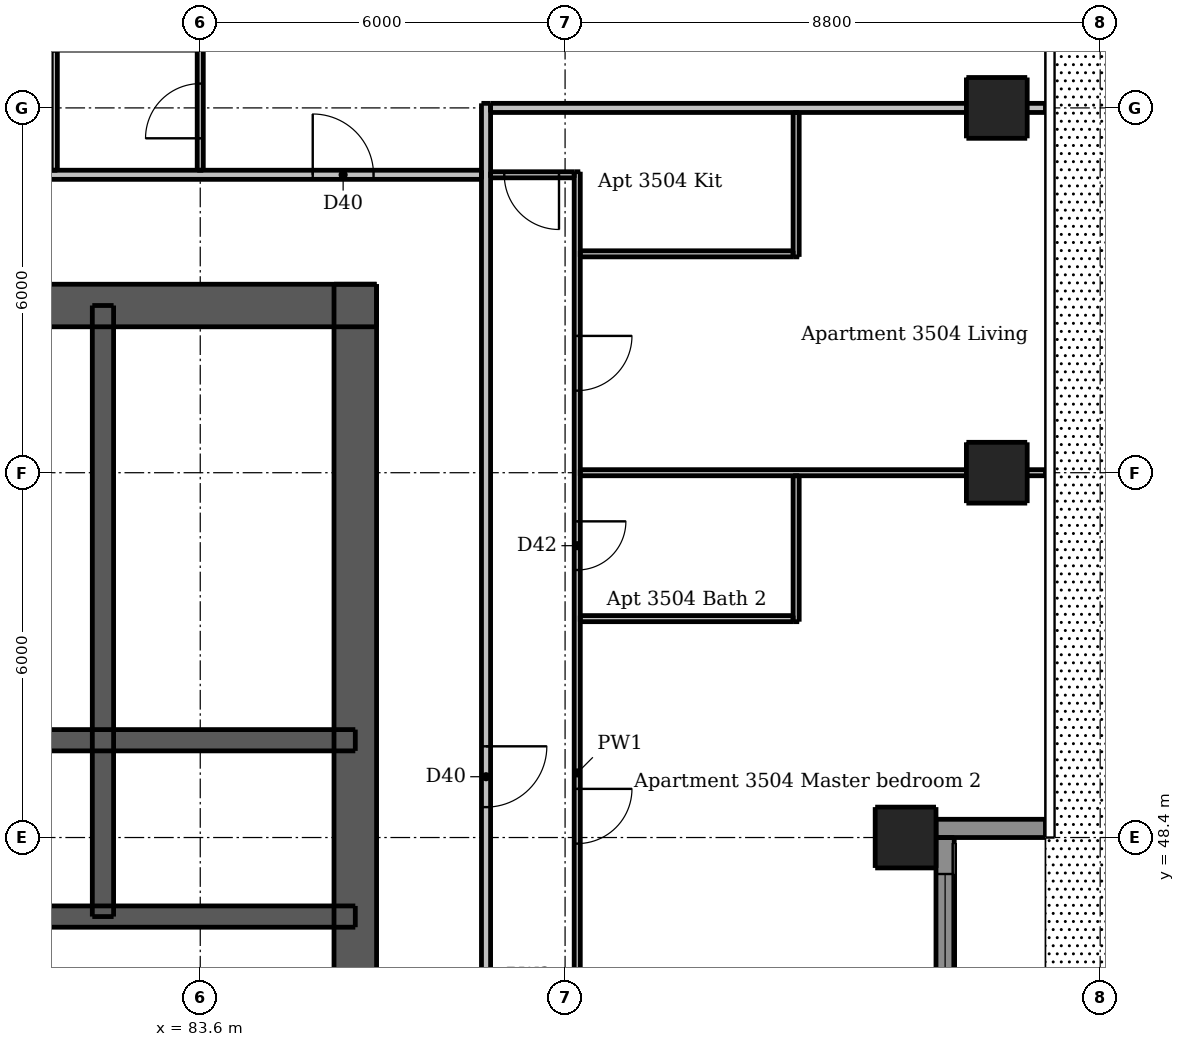
"""IFC4 building model, lengths in metres.
Left out: names, types, materials, properties, quantities, classifications, styles, units other than length and angle.
Written with IfcOpenShell. Run it as: python <this file> out.ifc"""

import sys

from ifc_helpers import new_model, si_unit, direction, frame, frame_2d, origin, origin_2d, place, context, subcontext, project, spatial, rectangle, extrude, element, fill, save


model = new_model("IFC4")
c1 = context("Model", 3, precision=1e-05, world=origin(), true_north=direction((0.0, 1.0)))
c2 = subcontext(c1, "Body", "Model", "MODEL_VIEW")
j1 = project(units=[si_unit("LENGTHUNIT", "METRE"), si_unit("PLANEANGLEUNIT", "RADIAN")], contexts=[c1])
p1 = place(None, origin())
s1 = spatial("IfcSite", under=j1, at=p1, CompositionType="ELEMENT")
p2 = place(p1, origin())
s2 = spatial("IfcBuilding", under=s1, at=p2, CompositionType="ELEMENT")
p3 = place(p2, frame((0.0, 0.0, 133.9)))
s3 = spatial("IfcBuildingStorey", under=s2, at=p3, CompositionType="ELEMENT", Elevation=133.9)
p4 = place(p3, frame((62.5, 57.15, 0.0), z_axis=(0.0, 0.0, 1.0), x_axis=(1.0, 0.0, 0.0)))
e1 = element("IfcWall", 1, at=p4, inside=s3, PredefinedType="SHEAR", context=c2, shape_type="SweptSolid", body=[
    extrude(rectangle(XDim=24.0, YDim=0.7, at=frame_2d((12.0, 0.0))), origin(), (0.0, 0.0, 1.0), 3.05),
])
p5 = place(p4, frame((20.938, 0.0, 0.0)))
e2 = element("IfcOpeningElement", 2, at=p5, cuts=e1, PredefinedType="OPENING", context=c2, shape_type="SweptSolid", body=[
    extrude(rectangle(XDim=1.1, YDim=2.1, at=frame_2d((0.55, 1.05))), frame((0.0, 0.36, 0.0), z_axis=(0.0, -1.0, 0.0), x_axis=(1.0, 0.0, 0.0)), (0.0, 0.0, 1.0), 0.72),
])
p6 = place(p4, frame((1.962, 0.0, 0.0)))
e3 = element("IfcOpeningElement", 3, at=p6, cuts=e1, PredefinedType="OPENING", context=c2, shape_type="SweptSolid", body=[
    extrude(rectangle(XDim=1.1, YDim=2.1, at=frame_2d((0.55, 1.05))), frame((0.0, 0.36, 0.0), z_axis=(0.0, -1.0, 0.0), x_axis=(1.0, 0.0, 0.0)), (0.0, 0.0, 1.0), 0.72),
])
p7 = place(p4, frame((6.423, 0.0, 0.0)))
e4 = element("IfcOpeningElement", 4, at=p7, cuts=e1, PredefinedType="OPENING", context=c2, shape_type="SweptSolid", body=[
    extrude(rectangle(XDim=0.9, YDim=2.1, at=frame_2d((0.45, 1.05))), frame((0.0, 0.36, 0.0), z_axis=(0.0, -1.0, 0.0), x_axis=(1.0, 0.0, 0.0)), (0.0, 0.0, 1.0), 0.72),
])
p8 = place(p4, frame((13.748, 0.0, 0.0)))
e5 = element("IfcOpeningElement", 5, at=p8, cuts=e1, PredefinedType="OPENING", context=c2, shape_type="SweptSolid", body=[
    extrude(rectangle(XDim=0.9, YDim=2.1, at=frame_2d((0.45, 1.05))), frame((0.0, 0.36, 0.0), z_axis=(0.0, -1.0, 0.0), x_axis=(1.0, 0.0, 0.0)), (0.0, 0.0, 1.0), 0.72),
])
p9 = place(p3, frame((86.15, 33.5, 0.0), z_axis=(0.0, 0.0, 1.0), x_axis=(0.0, 1.0, 0.0)))
e6 = element("IfcWall", 6, at=p9, inside=s3, PredefinedType="SHEAR", context=c2, shape_type="SweptSolid", body=[
    extrude(rectangle(XDim=24.0, YDim=0.7, at=frame_2d((12.0, 0.0))), origin(), (0.0, 0.0, 1.0), 3.05),
])
p10 = place(p9, frame((11.2, 0.0, 0.0)))
e7 = element("IfcOpeningElement", 7, at=p10, cuts=e6, PredefinedType="OPENING", context=c2, shape_type="SweptSolid", body=[
    extrude(rectangle(XDim=1.6, YDim=2.1, at=frame_2d((0.8, 1.05))), frame((0.0, 0.36, 0.0), z_axis=(0.0, -1.0, 0.0), x_axis=(1.0, 0.0, 0.0)), (0.0, 0.0, 1.0), 0.72),
])
p11 = place(p3, frame((62.85, 47.1, 0.0), z_axis=(0.0, 0.0, 1.0), x_axis=(1.0, 0.0, 0.0)))
e8 = element("IfcWall", 8, at=p11, inside=s3, PredefinedType="SHEAR", context=c2, shape_type="SweptSolid", body=[
    extrude(rectangle(XDim=23.3, YDim=0.35, at=frame_2d((11.65, 0.0))), origin(), (0.0, 0.0, 1.0), 3.05),
])
p12 = place(p11, frame((1.712, 0.0, 0.0)))
e9 = element("IfcOpeningElement", 9, at=p12, cuts=e8, PredefinedType="OPENING", context=c2, shape_type="SweptSolid", body=[
    extrude(rectangle(XDim=0.9, YDim=2.1, at=frame_2d((0.45, 1.05))), frame((0.0, 0.185, 0.0), z_axis=(0.0, -1.0, 0.0), x_axis=(1.0, 0.0, 0.0)), (0.0, 0.0, 1.0), 0.37),
])
p13 = place(p11, frame((20.688, 0.0, 0.0)))
e10 = element("IfcOpeningElement", 10, at=p13, cuts=e8, PredefinedType="OPENING", context=c2, shape_type="SweptSolid", body=[
    extrude(rectangle(XDim=0.9, YDim=2.1, at=frame_2d((0.45, 1.05))), frame((0.0, 0.185, 0.0), z_axis=(0.0, -1.0, 0.0), x_axis=(1.0, 0.0, 0.0)), (0.0, 0.0, 1.0), 0.37),
])
p14 = place(p3, frame((62.85, 50.0, 0.0), z_axis=(0.0, 0.0, 1.0), x_axis=(1.0, 0.0, 0.0)))
e11 = element("IfcWall", 11, at=p14, inside=s3, PredefinedType="SHEAR", context=c2, shape_type="SweptSolid", body=[
    extrude(rectangle(XDim=23.3, YDim=0.35, at=frame_2d((11.65, 0.0))), origin(), (0.0, 0.0, 1.0), 3.05),
])
p15 = place(p3, frame((82.0, 47.1, 0.0), z_axis=(0.0, 0.0, 1.0), x_axis=(0.0, 1.0, 0.0)))
e12 = element("IfcWall", 12, at=p15, inside=s3, PredefinedType="SHEAR", context=c2, shape_type="SweptSolid", body=[
    extrude(rectangle(XDim=10.05, YDim=0.35, at=frame_2d((5.025, 0.0))), origin(), (0.0, 0.0, 1.0), 3.05),
])
for number, where, z_axis, x_axis in (
    (13, (95.2, 48.4, 0.0), (0.0, 0.0, 1.0), (1.0, 0.0, 0.0)),
    (14, (96.7, 54.4, 0.0), (0.0, 0.0, 1.0), (1.0, 0.0, 0.0)),
    (15, (96.7, 60.4, 0.0), (0.0, 0.0, 1.0), (1.0, 0.0, 0.0)),
):
    element("IfcColumn", number, at=place(p3, frame(where, z_axis=z_axis, x_axis=x_axis)), inside=s3, PredefinedType="COLUMN", context=c2, shape_type="SweptSolid", body=[
        extrude(rectangle(XDim=1.0, YDim=1.0, at=origin_2d()), origin(), (0.0, 0.0, 1.0), 3.05),
    ])
p16 = place(p3, frame((95.7, 48.55, 0.0), z_axis=(0.0, 0.0, 1.0), x_axis=(1.0, 0.0, 0.0)))
e16 = element("IfcWall", 16, at=p16, inside=s3, PredefinedType="SOLIDWALL", context=c2, shape_type="SweptSolid", body=[
    extrude(rectangle(XDim=1.8, YDim=0.3, at=frame_2d((0.9, 0.0))), origin(), (0.0, 0.0, 1.0), 3.05),
])
p17 = place(p3, frame((95.85, 42.4, 0.0), z_axis=(0.0, 0.0, 1.0), x_axis=(0.0, 1.0, 0.0)))
e17 = element("IfcWall", 17, at=p17, inside=s3, PredefinedType="SOLIDWALL", context=c2, shape_type="SweptSolid", body=[
    extrude(rectangle(XDim=6.0, YDim=0.3, at=frame_2d((3.0, 0.0))), origin(), (0.0, 0.0, 1.0), 3.05),
])
p18 = place(p17, frame((0.6, 0.0, 0.15)))
e18 = element("IfcOpeningElement", 18, at=p18, cuts=e17, PredefinedType="OPENING", context=c2, shape_type="SweptSolid", body=[
    extrude(rectangle(XDim=1.8, YDim=2.1, at=frame_2d((0.9, 1.05))), frame((0.0, 0.16, 0.0), z_axis=(0.0, -1.0, 0.0), x_axis=(1.0, 0.0, 0.0)), (0.0, 0.0, 1.0), 0.32),
])
p19 = place(p17, frame((3.6, 0.0, 0.15)))
e19 = element("IfcOpeningElement", 19, at=p19, cuts=e17, PredefinedType="OPENING", context=c2, shape_type="SweptSolid", body=[
    extrude(rectangle(XDim=1.8, YDim=2.1, at=frame_2d((0.9, 1.05))), frame((0.0, 0.16, 0.0), z_axis=(0.0, -1.0, 0.0), x_axis=(1.0, 0.0, 0.0)), (0.0, 0.0, 1.0), 0.32),
])
p20 = place(p3, frame((81.2, 59.375, 0.0), z_axis=(0.0, 0.0, 1.0), x_axis=(0.0, 1.0, 0.0)))
e20 = element("IfcWall", 20, at=p20, inside=s3, PredefinedType="PARTITIONING", context=c2, shape_type="SweptSolid", body=[
    extrude(rectangle(XDim=1.975, YDim=0.1, at=frame_2d((0.988, 0.0))), origin(), (0.0, 0.0, 1.0), 3.05),
])
p21 = place(p3, frame((83.6, 59.375, 0.0), z_axis=(0.0, 0.0, 1.0), x_axis=(0.0, 1.0, 0.0)))
e21 = element("IfcWall", 21, at=p21, inside=s3, PredefinedType="PARTITIONING", context=c2, shape_type="SweptSolid", body=[
    extrude(rectangle(XDim=8.625, YDim=0.1, at=frame_2d((4.312, 0.0))), origin(), (0.0, 0.0, 1.0), 2.516),
])
p22 = place(p21, frame((0.525, 0.0, 0.0)))
e22 = element("IfcOpeningElement", 22, at=p22, cuts=e21, PredefinedType="OPENING", context=c2, shape_type="SweptSolid", body=[
    extrude(rectangle(XDim=0.9, YDim=2.1, at=frame_2d((0.45, 1.05))), frame((0.0, 0.06, 0.0), z_axis=(0.0, -1.0, 0.0), x_axis=(1.0, 0.0, 0.0)), (0.0, 0.0, 1.0), 0.12),
])
p23 = place(p21, frame((4.875, 0.0, 0.0)))
e23 = element("IfcOpeningElement", 23, at=p23, cuts=e21, PredefinedType="OPENING", context=c2, shape_type="SweptSolid", body=[
    extrude(rectangle(XDim=0.9, YDim=2.1, at=frame_2d((0.45, 1.05))), frame((0.0, 0.06, 0.0), z_axis=(0.0, -1.0, 0.0), x_axis=(1.0, 0.0, 0.0)), (0.0, 0.0, 1.0), 0.12),
])
p24 = place(p3, frame((89.8, 59.35, 0.0), z_axis=(0.0, 0.0, 1.0), x_axis=(0.0, -1.0, 0.0)))
e24 = element("IfcWall", 24, at=p24, inside=s3, PredefinedType="PARTITIONING", context=c2, shape_type="SweptSolid", body=[
    extrude(rectangle(XDim=19.775, YDim=0.1, at=frame_2d((9.888, 0.0))), origin(), (0.0, 0.0, 1.0), 3.05),
])
p25 = place(p24, frame((2.7, 0.0, 0.0)))
e25 = element("IfcOpeningElement", 25, at=p25, cuts=e24, PredefinedType="OPENING", context=c2, shape_type="SweptSolid", body=[
    extrude(rectangle(XDim=0.9, YDim=2.1, at=frame_2d((0.45, 1.05))), frame((0.0, 0.06, 0.0), z_axis=(0.0, -1.0, 0.0), x_axis=(1.0, 0.0, 0.0)), (0.0, 0.0, 1.0), 0.12),
])
p26 = place(p24, frame((17.6, 0.0, 0.0)))
e26 = element("IfcOpeningElement", 26, at=p26, cuts=e24, PredefinedType="OPENING", context=c2, shape_type="SweptSolid", body=[
    extrude(rectangle(XDim=0.9, YDim=2.1, at=frame_2d((0.45, 1.05))), frame((0.0, 0.06, 0.0), z_axis=(0.0, -1.0, 0.0), x_axis=(1.0, 0.0, 0.0)), (0.0, 0.0, 1.0), 0.12),
])
p27 = place(p24, frame((10.15, 0.0, 0.0)))
e27 = element("IfcOpeningElement", 27, at=p27, cuts=e24, PredefinedType="OPENING", context=c2, shape_type="SweptSolid", body=[
    extrude(rectangle(XDim=0.9, YDim=2.1, at=frame_2d((0.45, 1.05))), frame((0.0, 0.06, 0.0), z_axis=(0.0, -1.0, 0.0), x_axis=(1.0, 0.0, 0.0)), (0.0, 0.0, 1.0), 0.12),
])
p28 = place(p24, frame((14.65, 0.0, 0.0)))
e28 = element("IfcOpeningElement", 28, at=p28, cuts=e24, PredefinedType="OPENING", context=c2, shape_type="SweptSolid", body=[
    extrude(rectangle(XDim=0.8, YDim=2.1, at=frame_2d((0.4, 1.05))), frame((0.0, 0.06, 0.0), z_axis=(0.0, -1.0, 0.0), x_axis=(1.0, 0.0, 0.0)), (0.0, 0.0, 1.0), 0.12),
])
p29 = place(p24, frame((5.75, 0.0, 0.0)))
e29 = element("IfcOpeningElement", 29, at=p29, cuts=e24, PredefinedType="OPENING", context=c2, shape_type="SweptSolid", body=[
    extrude(rectangle(XDim=0.8, YDim=2.1, at=frame_2d((0.4, 1.05))), frame((0.0, 0.06, 0.0), z_axis=(0.0, -1.0, 0.0), x_axis=(1.0, 0.0, 0.0)), (0.0, 0.0, 1.0), 0.12),
])
p30 = place(p3, frame((93.4, 51.95, 0.0), z_axis=(0.0, 0.0, 1.0), x_axis=(0.0, 1.0, 0.0)))
e30 = element("IfcWall", 30, at=p30, inside=s3, PredefinedType="PARTITIONING", context=c2, shape_type="SweptSolid", body=[
    extrude(rectangle(XDim=2.4, YDim=0.1, at=frame_2d((1.2, 0.0))), origin(), (0.0, 0.0, 1.0), 3.05),
])
p31 = place(p3, frame((93.4, 57.95, 0.0), z_axis=(0.0, 0.0, 1.0), x_axis=(0.0, 1.0, 0.0)))
e31 = element("IfcWall", 31, at=p31, inside=s3, PredefinedType="PARTITIONING", context=c2, shape_type="SweptSolid", body=[
    extrude(rectangle(XDim=2.375, YDim=0.1, at=frame_2d((1.188, 0.0))), origin(), (0.0, 0.0, 1.0), 3.05),
])
p32 = place(p3, frame((89.75, 59.3, 0.0), z_axis=(0.0, 0.0, 1.0), x_axis=(-1.0, 0.0, 0.0)))
e32 = element("IfcWall", 32, at=p32, inside=s3, PredefinedType="PARTITIONING", context=c2, shape_type="SweptSolid", body=[
    extrude(rectangle(XDim=1.375, YDim=0.1, at=frame_2d((0.688, 0.0))), origin(), (0.0, 0.0, 1.0), 3.05),
])
p33 = place(p32, frame((0.25, 0.0, 0.0)))
e33 = element("IfcOpeningElement", 33, at=p33, cuts=e32, PredefinedType="OPENING", context=c2, shape_type="SweptSolid", body=[
    extrude(rectangle(XDim=0.9, YDim=2.1, at=frame_2d((0.45, 1.05))), frame((0.0, 0.06, 0.0), z_axis=(0.0, -1.0, 0.0), x_axis=(1.0, 0.0, 0.0)), (0.0, 0.0, 1.0), 0.12),
])
p34 = place(p3, frame((89.85, 58.0, 0.0), z_axis=(0.0, 0.0, 1.0), x_axis=(1.0, 0.0, 0.0)))
e34 = element("IfcWall", 34, at=p34, inside=s3, PredefinedType="PARTITIONING", context=c2, shape_type="SweptSolid", body=[
    extrude(rectangle(XDim=3.5, YDim=0.1, at=frame_2d((1.75, 0.0))), origin(), (0.0, 0.0, 1.0), 3.05),
])
p35 = place(p3, frame((89.85, 54.4, 0.0), z_axis=(0.0, 0.0, 1.0), x_axis=(1.0, 0.0, 0.0)))
e35 = element("IfcWall", 35, at=p35, inside=s3, PredefinedType="PARTITIONING", context=c2, shape_type="SweptSolid", body=[
    extrude(rectangle(XDim=7.65, YDim=0.1, at=frame_2d((3.825, 0.0))), origin(), (0.0, 0.0, 1.0), 2.516),
])
p36 = place(p3, frame((89.85, 52.0, 0.0), z_axis=(0.0, 0.0, 1.0), x_axis=(1.0, 0.0, 0.0)))
e36 = element("IfcWall", 36, at=p36, inside=s3, PredefinedType="PARTITIONING", context=c2, shape_type="SweptSolid", body=[
    extrude(rectangle(XDim=3.5, YDim=0.1, at=frame_2d((1.75, 0.0))), origin(), (0.0, 0.0, 1.0), 3.05),
])
p37 = place(p3, frame((88.3, 60.475, 0.0), z_axis=(0.0, 0.0, 1.0), x_axis=(0.0, -1.0, 0.0)))
e37 = element("IfcWall", 37, at=p37, inside=s3, PredefinedType="PARTITIONING", context=c2, shape_type="SweptSolid", body=[
    extrude(rectangle(XDim=28.7, YDim=0.15, at=frame_2d((14.35, 0.0))), origin(), (0.0, 0.0, 1.0), 3.05),
])
p38 = place(p37, frame((27.425, 0.0, 0.0)))
e38 = element("IfcOpeningElement", 38, at=p38, cuts=e37, PredefinedType="OPENING", context=c2, shape_type="SweptSolid", body=[
    extrude(rectangle(XDim=1.0, YDim=2.1, at=frame_2d((0.5, 1.05))), frame((0.0, 0.085, 0.0), z_axis=(0.0, -1.0, 0.0), x_axis=(1.0, 0.0, 0.0)), (0.0, 0.0, 1.0), 0.17),
])
p39 = place(p37, frame((10.575, 0.0, 0.0)))
e39 = element("IfcOpeningElement", 39, at=p39, cuts=e37, PredefinedType="OPENING", context=c2, shape_type="SweptSolid", body=[
    extrude(rectangle(XDim=1.0, YDim=2.1, at=frame_2d((0.5, 1.05))), frame((0.0, 0.085, 0.0), z_axis=(0.0, -1.0, 0.0), x_axis=(1.0, 0.0, 0.0)), (0.0, 0.0, 1.0), 0.17),
])
p40 = place(p3, frame((88.375, 60.4, 0.0), z_axis=(0.0, 0.0, 1.0), x_axis=(1.0, 0.0, 0.0)))
e40 = element("IfcWall", 40, at=p40, inside=s3, PredefinedType="PARTITIONING", context=c2, shape_type="SweptSolid", body=[
    extrude(rectangle(XDim=9.125, YDim=0.15, at=frame_2d((4.562, 0.0))), origin(), (0.0, 0.0, 1.0), 2.647),
])
p41 = place(p3, frame((59.675, 59.3, 0.0), z_axis=(0.0, 0.0, 1.0), x_axis=(1.0, 0.0, 0.0)))
e41 = element("IfcWall", 41, at=p41, inside=s3, PredefinedType="PARTITIONING", context=c2, shape_type="SweptSolid", body=[
    extrude(rectangle(XDim=28.55, YDim=0.15, at=frame_2d((14.275, 0.0))), origin(), (0.0, 0.0, 1.0), 3.05),
])
p42 = place(p41, frame((8.975, 0.0, 0.0)))
e42 = element("IfcOpeningElement", 42, at=p42, cuts=e41, PredefinedType="OPENING", context=c2, shape_type="SweptSolid", body=[
    extrude(rectangle(XDim=1.0, YDim=2.1, at=frame_2d((0.5, 1.05))), frame((0.0, 0.085, 0.0), z_axis=(0.0, -1.0, 0.0), x_axis=(1.0, 0.0, 0.0)), (0.0, 0.0, 1.0), 0.17),
])
p43 = place(p41, frame((25.775, 0.0, 0.0)))
e43 = element("IfcOpeningElement", 43, at=p43, cuts=e41, PredefinedType="OPENING", context=c2, shape_type="SweptSolid", body=[
    extrude(rectangle(XDim=1.0, YDim=2.1, at=frame_2d((0.5, 1.05))), frame((0.0, 0.085, 0.0), z_axis=(0.0, -1.0, 0.0), x_axis=(1.0, 0.0, 0.0)), (0.0, 0.0, 1.0), 0.17),
])
p44 = place(p19, origin())
e44 = element("IfcWindow", 44, at=p44, inside=s3, PartitioningType="DOUBLE_PANEL_VERTICAL", PredefinedType="WINDOW", context=c2, shape_type="SweptSolid", body=[
    extrude(rectangle(XDim=1.8, YDim=2.1, at=frame_2d((0.9, 1.05))), frame((0.0, 0.03, 0.0), z_axis=(0.0, -1.0, 0.0), x_axis=(1.0, 0.0, 0.0)), (0.0, 0.0, 1.0), 0.06),
])
fill(e19, e44)
p45 = place(p5, origin())
e45 = element("IfcDoor", 45, at=p45, inside=s3, OperationType="SINGLE_SWING_RIGHT", PredefinedType="DOOR", context=c2, shape_type="SweptSolid", body=[
    extrude(rectangle(XDim=1.1, YDim=2.1, at=frame_2d((0.55, 1.05))), frame((0.0, -0.288, 0.0), z_axis=(0.0, -1.0, 0.0), x_axis=(1.0, 0.0, 0.0)), (0.0, 0.0, 1.0), 0.05),
])
fill(e2, e45)
p46 = place(p10, origin())
e46 = element("IfcDoor", 46, at=p46, inside=s3, OperationType="DOUBLE_DOOR_SINGLE_SWING", PredefinedType="DOOR", context=c2, shape_type="SweptSolid", body=[
    extrude(rectangle(XDim=1.6, YDim=2.1, at=frame_2d((0.8, 1.05))), frame((0.0, 0.337, 0.0), z_axis=(0.0, -1.0, 0.0), x_axis=(1.0, 0.0, 0.0)), (0.0, 0.0, 1.0), 0.05),
])
fill(e7, e46)
p47 = place(p13, origin())
e47 = element("IfcDoor", 47, at=p47, inside=s3, OperationType="SINGLE_SWING_LEFT", PredefinedType="DOOR", context=c2, shape_type="SweptSolid", body=[
    extrude(rectangle(XDim=0.9, YDim=2.1, at=frame_2d((0.45, 1.05))), frame((0.0, 0.163, 0.0), z_axis=(0.0, -1.0, 0.0), x_axis=(1.0, 0.0, 0.0)), (0.0, 0.0, 1.0), 0.05),
])
fill(e10, e47)
p48 = place(p39, origin())
e48 = element("IfcDoor", 48, at=p48, inside=s3, OperationType="SINGLE_SWING_LEFT", PredefinedType="DOOR", context=c2, shape_type="SweptSolid", body=[
    extrude(rectangle(XDim=1.0, YDim=2.1, at=frame_2d((0.5, 1.05))), frame((0.0, 0.025, 0.0), z_axis=(0.0, -1.0, 0.0), x_axis=(1.0, 0.0, 0.0)), (0.0, 0.0, 1.0), 0.05),
])
fill(e39, e48)
p49 = place(p25, origin())
e49 = element("IfcDoor", 49, at=p49, inside=s3, OperationType="SINGLE_SWING_LEFT", PredefinedType="DOOR", context=c2, shape_type="SweptSolid", body=[
    extrude(rectangle(XDim=0.9, YDim=2.1, at=frame_2d((0.45, 1.05))), frame((0.0, 0.025, 0.0), z_axis=(0.0, -1.0, 0.0), x_axis=(1.0, 0.0, 0.0)), (0.0, 0.0, 1.0), 0.05),
])
fill(e25, e49)
p50 = place(p33, origin())
e50 = element("IfcDoor", 50, at=p50, inside=s3, OperationType="SINGLE_SWING_LEFT", PredefinedType="DOOR", context=c2, shape_type="SweptSolid", body=[
    extrude(rectangle(XDim=0.9, YDim=2.1, at=frame_2d((0.45, 1.05))), frame((0.0, 0.025, 0.0), z_axis=(0.0, -1.0, 0.0), x_axis=(1.0, 0.0, 0.0)), (0.0, 0.0, 1.0), 0.05),
])
fill(e33, e50)
p51 = place(p27, origin())
e51 = element("IfcDoor", 51, at=p51, inside=s3, OperationType="SINGLE_SWING_LEFT", PredefinedType="DOOR", context=c2, shape_type="SweptSolid", body=[
    extrude(rectangle(XDim=0.9, YDim=2.1, at=frame_2d((0.45, 1.05))), frame((0.0, 0.025, 0.0), z_axis=(0.0, -1.0, 0.0), x_axis=(1.0, 0.0, 0.0)), (0.0, 0.0, 1.0), 0.05),
])
fill(e27, e51)
p52 = place(p29, origin())
e52 = element("IfcDoor", 52, at=p52, inside=s3, OperationType="SINGLE_SWING_LEFT", PredefinedType="DOOR", context=c2, shape_type="SweptSolid", body=[
    extrude(rectangle(XDim=0.8, YDim=2.1, at=frame_2d((0.4, 1.05))), frame((0.0, 0.025, 0.0), z_axis=(0.0, -1.0, 0.0), x_axis=(1.0, 0.0, 0.0)), (0.0, 0.0, 1.0), 0.05),
])
fill(e29, e52)
p53 = place(p43, origin())
e53 = element("IfcDoor", 53, at=p53, inside=s3, OperationType="SINGLE_SWING_LEFT", PredefinedType="DOOR", context=c2, shape_type="SweptSolid", body=[
    extrude(rectangle(XDim=1.0, YDim=2.1, at=frame_2d((0.5, 1.05))), frame((0.0, 0.025, 0.0), z_axis=(0.0, -1.0, 0.0), x_axis=(1.0, 0.0, 0.0)), (0.0, 0.0, 1.0), 0.05),
])
fill(e43, e53)
p54 = place(p22, origin())
e54 = element("IfcDoor", 54, at=p54, inside=s3, OperationType="SINGLE_SWING_LEFT", PredefinedType="DOOR", context=c2, shape_type="SweptSolid", body=[
    extrude(rectangle(XDim=0.9, YDim=2.1, at=frame_2d((0.45, 1.05))), frame((0.0, 0.025, 0.0), z_axis=(0.0, -1.0, 0.0), x_axis=(1.0, 0.0, 0.0)), (0.0, 0.0, 1.0), 0.05),
])
fill(e22, e54)
save(model, sys.argv[1])
